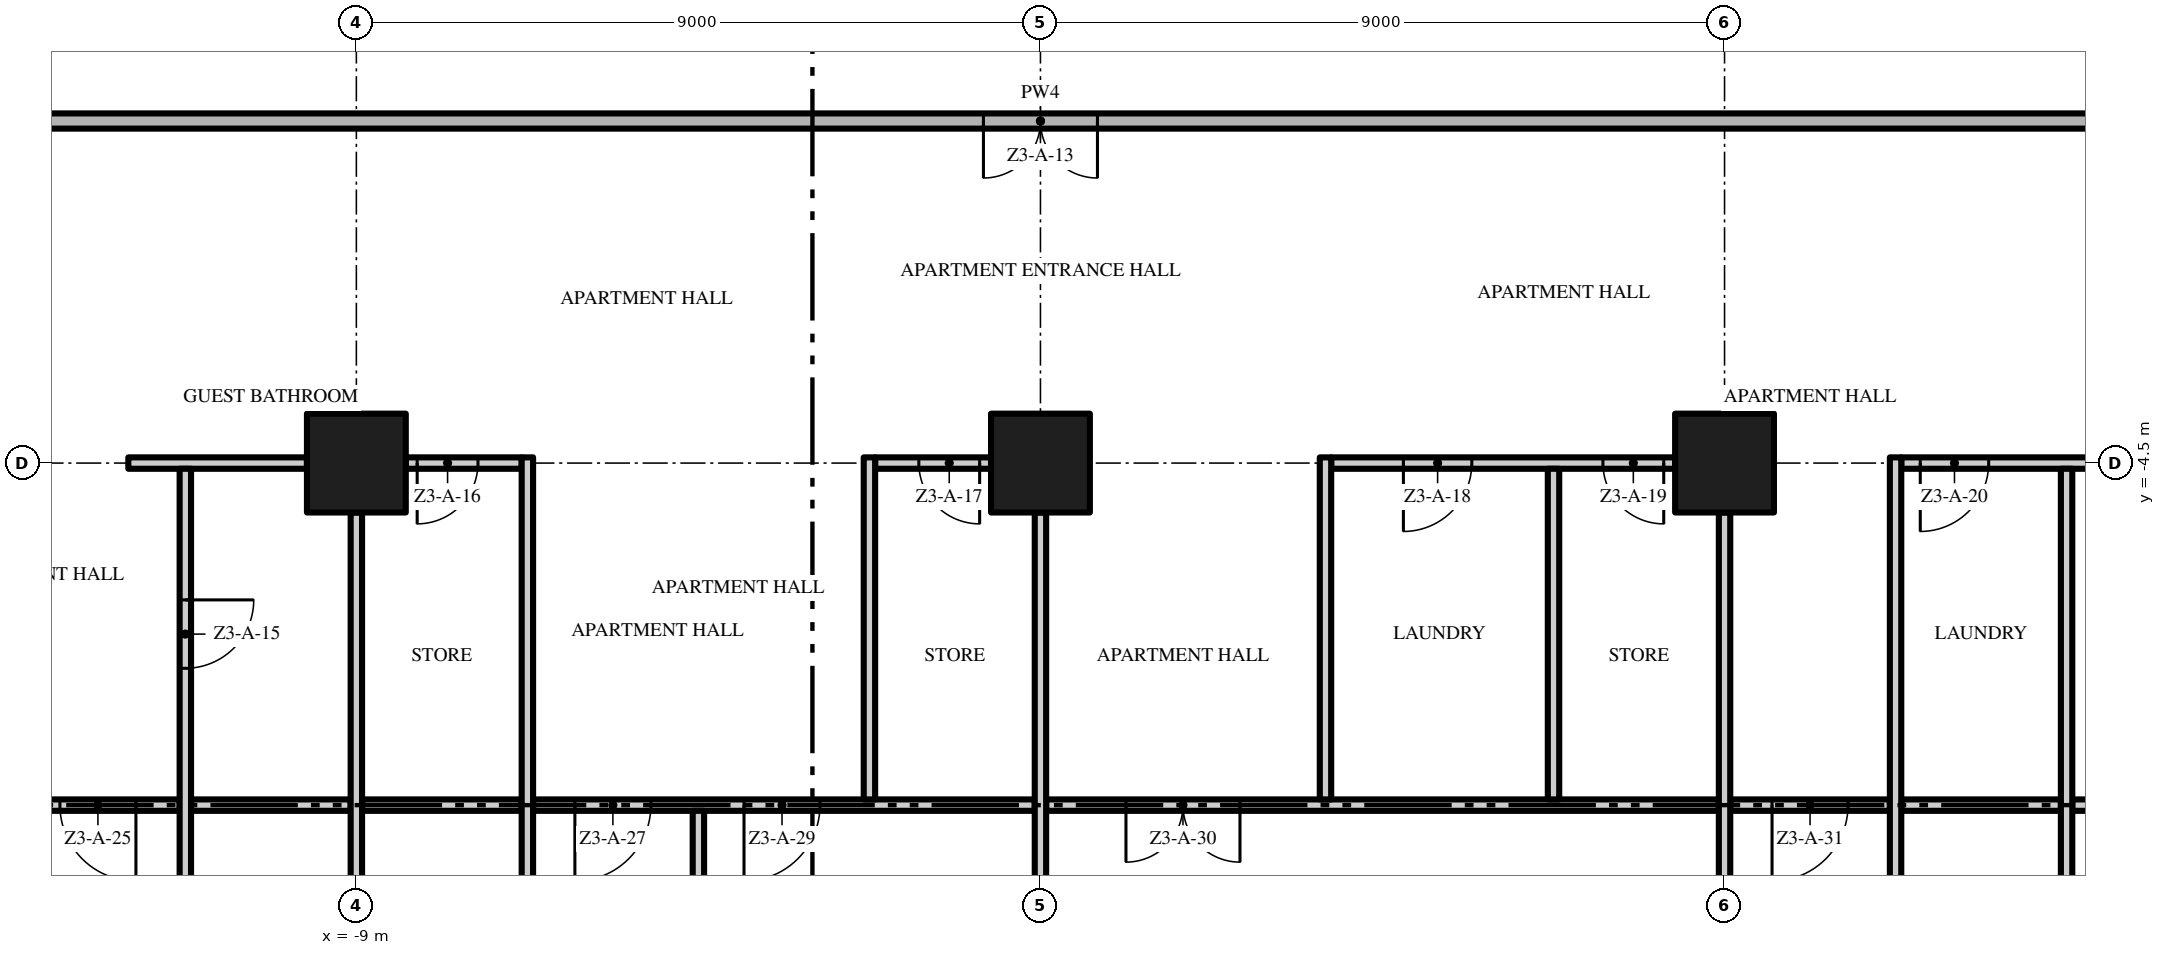
"""IFC4 building model, lengths in metres.
Left out: names, types, materials, properties, quantities, classifications, styles, units other than length and angle.
Written with IfcOpenShell. Run it as: python <this file> out.ifc"""

import sys

from ifc_helpers import new_model, si_unit, direction, frame, frame_2d, origin, origin_2d, place, context, subcontext, project, spatial, rectangle, extrude, element, fill, save


model = new_model("IFC4")
c1 = context("Model", 3, precision=1e-05, world=origin(), true_north=direction((0.0, 1.0)))
c2 = subcontext(c1, "Body", "Model", "MODEL_VIEW")
j1 = project(units=[si_unit("LENGTHUNIT", "METRE"), si_unit("PLANEANGLEUNIT", "RADIAN")], contexts=[c1])
p1 = place(None, origin())
s1 = spatial("IfcSite", under=j1, at=p1, CompositionType="ELEMENT")
p2 = place(p1, origin())
s2 = spatial("IfcBuilding", under=s1, at=p2, CompositionType="ELEMENT")
p3 = place(p2, frame((0.0, 0.0, 132.6)))
s3 = spatial("IfcBuildingStorey", under=s2, at=p3, CompositionType="ELEMENT", Elevation=132.6)
for number, where, z_axis, x_axis in (
    (1, (-9.0, -4.5, 0.0), (0.0, 0.0, 1.0), (1.0, 0.0, 0.0)),
    (2, (0.0, -4.5, 0.0), (0.0, 0.0, 1.0), (1.0, 0.0, 0.0)),
    (3, (9.0, -4.5, 0.0), (0.0, 0.0, 1.0), (1.0, 0.0, 0.0)),
):
    element("IfcColumn", number, at=place(p3, frame(where, z_axis=z_axis, x_axis=x_axis)), inside=s3, PredefinedType="COLUMN", context=c2, shape_type="SweptSolid", body=[
        extrude(rectangle(XDim=1.3, YDim=1.3, at=origin_2d()), origin(), (0.0, 0.0, 1.0), 3.5),
    ])
p4 = place(p3, frame((-11.325, -9.0, 0.0), z_axis=(0.0, 0.0, 1.0), x_axis=(-1.0, 0.0, 0.0)))
e4 = element("IfcWall", 4, at=p4, inside=s3, PredefinedType="PARTITIONING", context=c2, shape_type="SweptSolid", body=[
    extrude(rectangle(XDim=10.875, YDim=0.15, at=frame_2d((5.438, 0.0))), origin(), (0.0, 0.0, 1.0), 3.5),
])
p5 = place(p4, frame((3.175, 0.0, 0.0)))
e5 = element("IfcOpeningElement", 5, at=p5, cuts=e4, PredefinedType="OPENING", context=c2, shape_type="SweptSolid", body=[
    extrude(rectangle(XDim=1.8, YDim=2.4, at=frame_2d((0.9, 1.2))), frame((0.0, 0.085, 0.0), z_axis=(0.0, -1.0, 0.0), x_axis=(1.0, 0.0, 0.0)), (0.0, 0.0, 1.0), 0.17),
])
p6 = place(p4, frame((0.575, 0.0, 0.0)))
e6 = element("IfcOpeningElement", 6, at=p6, cuts=e4, PredefinedType="OPENING", context=c2, shape_type="SweptSolid", body=[
    extrude(rectangle(XDim=1.0, YDim=2.4, at=frame_2d((0.5, 1.2))), frame((0.0, 0.085, 0.0), z_axis=(0.0, -1.0, 0.0), x_axis=(1.0, 0.0, 0.0)), (0.0, 0.0, 1.0), 0.17),
])
for number, where, z_axis, x_axis in (
    (7, (-11.175, -9.0, 0.0), (0.0, 0.0, 1.0), (1.0, 0.0, 0.0)),
    (8, (-8.925, -9.0, 0.0), (0.0, 0.0, 1.0), (1.0, 0.0, 0.0)),
):
    element("IfcWall", number, at=place(p3, frame(where, z_axis=z_axis, x_axis=x_axis)), inside=s3, PredefinedType="PARTITIONING", context=c2, shape_type="SweptSolid", body=[
        extrude(rectangle(XDim=2.1, YDim=0.15, at=frame_2d((1.05, 0.0))), origin(), (0.0, 0.0, 1.0), 3.5),
    ])
p7 = place(p3, frame((-0.075, -9.0, 0.0), z_axis=(0.0, 0.0, 1.0), x_axis=(-1.0, 0.0, 0.0)))
e9 = element("IfcWall", 9, at=p7, inside=s3, PredefinedType="PARTITIONING", context=c2, shape_type="SweptSolid", body=[
    extrude(rectangle(XDim=6.6, YDim=0.15, at=frame_2d((3.3, 0.0))), origin(), (0.0, 0.0, 1.0), 3.5),
])
p8 = place(p7, frame((5.05, 0.0, 0.0)))
e10 = element("IfcOpeningElement", 10, at=p8, cuts=e9, PredefinedType="OPENING", context=c2, shape_type="SweptSolid", body=[
    extrude(rectangle(XDim=1.0, YDim=2.4, at=frame_2d((0.5, 1.2))), frame((0.0, 0.085, 0.0), z_axis=(0.0, -1.0, 0.0), x_axis=(1.0, 0.0, 0.0)), (0.0, 0.0, 1.0), 0.17),
])
p9 = place(p7, frame((2.825, 0.0, 0.0)))
e11 = element("IfcOpeningElement", 11, at=p9, cuts=e9, PredefinedType="OPENING", context=c2, shape_type="SweptSolid", body=[
    extrude(rectangle(XDim=1.0, YDim=2.4, at=frame_2d((0.5, 1.2))), frame((0.0, 0.085, 0.0), z_axis=(0.0, -1.0, 0.0), x_axis=(1.0, 0.0, 0.0)), (0.0, 0.0, 1.0), 0.17),
])
p10 = place(p3, frame((8.925, -9.0, 0.0), z_axis=(0.0, 0.0, 1.0), x_axis=(-1.0, 0.0, 0.0)))
e12 = element("IfcWall", 12, at=p10, inside=s3, PredefinedType="PARTITIONING", context=c2, shape_type="SweptSolid", body=[
    extrude(rectangle(XDim=8.85, YDim=0.15, at=frame_2d((4.425, 0.0))), origin(), (0.0, 0.0, 1.0), 3.5),
])
p11 = place(p10, frame((6.3, 0.0, 0.0)))
e13 = element("IfcOpeningElement", 13, at=p11, cuts=e12, PredefinedType="OPENING", context=c2, shape_type="SweptSolid", body=[
    extrude(rectangle(XDim=1.5, YDim=2.4, at=frame_2d((0.75, 1.2))), frame((0.0, 0.085, 0.0), z_axis=(0.0, -1.0, 0.0), x_axis=(1.0, 0.0, 0.0)), (0.0, 0.0, 1.0), 0.17),
])
p12 = place(p3, frame((11.175, -9.0, 0.0), z_axis=(0.0, 0.0, 1.0), x_axis=(-1.0, 0.0, 0.0)))
e14 = element("IfcWall", 14, at=p12, inside=s3, PredefinedType="PARTITIONING", context=c2, shape_type="SweptSolid", body=[
    extrude(rectangle(XDim=2.1, YDim=0.15, at=frame_2d((1.05, 0.0))), origin(), (0.0, 0.0, 1.0), 3.5),
])
p13 = place(p12, frame((0.55, 0.0, 0.0)))
e15 = element("IfcOpeningElement", 15, at=p13, cuts=e14, PredefinedType="OPENING", context=c2, shape_type="SweptSolid", body=[
    extrude(rectangle(XDim=1.0, YDim=2.4, at=frame_2d((0.5, 1.2))), frame((0.0, 0.085, 0.0), z_axis=(0.0, -1.0, 0.0), x_axis=(1.0, 0.0, 0.0)), (0.0, 0.0, 1.0), 0.17),
])
for number, where, z_axis, x_axis in (
    (16, (11.325, -9.0, 0.0), (0.0, 0.0, 1.0), (1.0, 0.0, 0.0)),
    (17, (13.575, -9.0, 0.0), (0.0, 0.0, 1.0), (1.0, 0.0, 0.0)),
):
    element("IfcWall", number, at=place(p3, frame(where, z_axis=z_axis, x_axis=x_axis)), inside=s3, PredefinedType="PARTITIONING", context=c2, shape_type="SweptSolid", body=[
        extrude(rectangle(XDim=2.1, YDim=0.15, at=frame_2d((1.05, 0.0))), origin(), (0.0, 0.0, 1.0), 3.5),
    ])
p14 = place(p3, frame((-12.0, -4.5, 0.0), z_axis=(0.0, 0.0, 1.0), x_axis=(1.0, 0.0, 0.0)))
e18 = element("IfcWall", 18, at=p14, inside=s3, PredefinedType="PARTITIONING", context=c2, shape_type="SweptSolid", body=[
    extrude(rectangle(XDim=2.35, YDim=0.15, at=frame_2d((1.175, 0.0))), origin(), (0.0, 0.0, 1.0), 3.5),
])
p15 = place(p3, frame((-6.825, -4.5, 0.0), z_axis=(0.0, 0.0, 1.0), x_axis=(-1.0, 0.0, 0.0)))
e19 = element("IfcWall", 19, at=p15, inside=s3, PredefinedType="PARTITIONING", context=c2, shape_type="SweptSolid", body=[
    extrude(rectangle(XDim=1.525, YDim=0.15, at=frame_2d((0.762, 0.0))), origin(), (0.0, 0.0, 1.0), 3.5),
])
p16 = place(p15, frame((0.575, 0.0, 0.0)))
e20 = element("IfcOpeningElement", 20, at=p16, cuts=e19, PredefinedType="OPENING", context=c2, shape_type="SweptSolid", body=[
    extrude(rectangle(XDim=0.8, YDim=2.0, at=frame_2d((0.4, 1.0))), frame((0.0, 0.085, 0.0), z_axis=(0.0, -1.0, 0.0), x_axis=(1.0, 0.0, 0.0)), (0.0, 0.0, 1.0), 0.17),
])
p17 = place(p3, frame((-0.65, -4.5, 0.0), z_axis=(0.0, 0.0, 1.0), x_axis=(-1.0, 0.0, 0.0)))
e21 = element("IfcWall", 21, at=p17, inside=s3, PredefinedType="PARTITIONING", context=c2, shape_type="SweptSolid", body=[
    extrude(rectangle(XDim=1.525, YDim=0.15, at=frame_2d((0.762, 0.0))), origin(), (0.0, 0.0, 1.0), 3.5),
])
p18 = place(p17, frame((0.15, 0.0, 0.0)))
e22 = element("IfcOpeningElement", 22, at=p18, cuts=e21, PredefinedType="OPENING", context=c2, shape_type="SweptSolid", body=[
    extrude(rectangle(XDim=0.8, YDim=2.0, at=frame_2d((0.4, 1.0))), frame((0.0, 0.085, 0.0), z_axis=(0.0, -1.0, 0.0), x_axis=(1.0, 0.0, 0.0)), (0.0, 0.0, 1.0), 0.17),
])
p19 = place(p3, frame((8.35, -4.5, 0.0), z_axis=(0.0, 0.0, 1.0), x_axis=(-1.0, 0.0, 0.0)))
e23 = element("IfcWall", 23, at=p19, inside=s3, PredefinedType="PARTITIONING", context=c2, shape_type="SweptSolid", body=[
    extrude(rectangle(XDim=4.525, YDim=0.15, at=frame_2d((2.263, 0.0))), origin(), (0.0, 0.0, 1.0), 3.5),
])
p20 = place(p19, frame((2.675, 0.0, 0.0)))
e24 = element("IfcOpeningElement", 24, at=p20, cuts=e23, PredefinedType="OPENING", context=c2, shape_type="SweptSolid", body=[
    extrude(rectangle(XDim=0.9, YDim=2.1, at=frame_2d((0.45, 1.05))), frame((0.0, 0.085, 0.0), z_axis=(0.0, -1.0, 0.0), x_axis=(1.0, 0.0, 0.0)), (0.0, 0.0, 1.0), 0.17),
])
p21 = place(p19, frame((0.15, 0.0, 0.0)))
e25 = element("IfcOpeningElement", 25, at=p21, cuts=e23, PredefinedType="OPENING", context=c2, shape_type="SweptSolid", body=[
    extrude(rectangle(XDim=0.8, YDim=2.0, at=frame_2d((0.4, 1.0))), frame((0.0, 0.085, 0.0), z_axis=(0.0, -1.0, 0.0), x_axis=(1.0, 0.0, 0.0)), (0.0, 0.0, 1.0), 0.17),
])
p22 = place(p3, frame((15.675, -4.5, 0.0), z_axis=(0.0, 0.0, 1.0), x_axis=(-1.0, 0.0, 0.0)))
e26 = element("IfcWall", 26, at=p22, inside=s3, PredefinedType="PARTITIONING", context=c2, shape_type="SweptSolid", body=[
    extrude(rectangle(XDim=4.35, YDim=0.15, at=frame_2d((2.175, 0.0))), origin(), (0.0, 0.0, 1.0), 3.5),
])
p23 = place(p22, frame((3.2, 0.0, 0.0)))
e27 = element("IfcOpeningElement", 27, at=p23, cuts=e26, PredefinedType="OPENING", context=c2, shape_type="SweptSolid", body=[
    extrude(rectangle(XDim=0.9, YDim=2.1, at=frame_2d((0.45, 1.05))), frame((0.0, 0.085, 0.0), z_axis=(0.0, -1.0, 0.0), x_axis=(1.0, 0.0, 0.0)), (0.0, 0.0, 1.0), 0.17),
])
p24 = place(p22, frame((0.675, 0.0, 0.0)))
e28 = element("IfcOpeningElement", 28, at=p24, cuts=e26, PredefinedType="OPENING", context=c2, shape_type="SweptSolid", body=[
    extrude(rectangle(XDim=0.8, YDim=2.0, at=frame_2d((0.4, 1.0))), frame((0.0, 0.085, 0.0), z_axis=(0.0, -1.0, 0.0), x_axis=(1.0, 0.0, 0.0)), (0.0, 0.0, 1.0), 0.17),
])
p25 = place(p3, frame((17.5, 0.0, 0.0), z_axis=(0.0, 0.0, 1.0), x_axis=(-1.0, 0.0, 0.0)))
e29 = element("IfcWall", 29, at=p25, inside=s3, PredefinedType="PARTITIONING", context=c2, shape_type="SweptSolid", body=[
    extrude(rectangle(XDim=35.0, YDim=0.2, at=frame_2d((17.5, 0.0))), origin(), (0.0, 0.0, 1.0), 3.5),
])
p26 = place(p25, frame((16.75, 0.0, 0.0)))
e30 = element("IfcOpeningElement", 30, at=p26, cuts=e29, PredefinedType="OPENING", context=c2, shape_type="SweptSolid", body=[
    extrude(rectangle(XDim=1.5, YDim=2.4, at=frame_2d((0.75, 1.2))), frame((0.0, 0.11, 0.0), z_axis=(0.0, -1.0, 0.0), x_axis=(1.0, 0.0, 0.0)), (0.0, 0.0, 1.0), 0.22),
])
p27 = place(p3, frame((-11.25, -4.575, 0.0), z_axis=(0.0, 0.0, 1.0), x_axis=(0.0, -1.0, 0.0)))
e31 = element("IfcWall", 31, at=p27, inside=s3, PredefinedType="PARTITIONING", context=c2, shape_type="SweptSolid", body=[
    extrude(rectangle(XDim=7.5, YDim=0.15, at=frame_2d((3.75, 0.0))), origin(), (0.0, 0.0, 1.0), 3.5),
])
p28 = place(p27, frame((1.725, 0.0, 0.0)))
e32 = element("IfcOpeningElement", 32, at=p28, cuts=e31, PredefinedType="OPENING", context=c2, shape_type="SweptSolid", body=[
    extrude(rectangle(XDim=0.9, YDim=2.1, at=frame_2d((0.45, 1.05))), frame((0.0, 0.085, 0.0), z_axis=(0.0, -1.0, 0.0), x_axis=(1.0, 0.0, 0.0)), (0.0, 0.0, 1.0), 0.17),
])
p29 = place(p3, frame((-9.0, -12.85, 0.0), z_axis=(0.0, 0.0, 1.0), x_axis=(0.0, 1.0, 0.0)))
e33 = element("IfcWall", 33, at=p29, inside=s3, PredefinedType="PARTITIONING", context=c2, shape_type="SweptSolid", body=[
    extrude(rectangle(XDim=7.7, YDim=0.15, at=frame_2d((3.85, 0.0))), origin(), (0.0, 0.0, 1.0), 3.5),
])
p30 = place(p3, frame((-6.75, -12.075, 0.0), z_axis=(0.0, 0.0, 1.0), x_axis=(0.0, 1.0, 0.0)))
e34 = element("IfcWall", 34, at=p30, inside=s3, PredefinedType="PARTITIONING", context=c2, shape_type="SweptSolid", body=[
    extrude(rectangle(XDim=7.65, YDim=0.15, at=frame_2d((3.825, 0.0))), origin(), (0.0, 0.0, 1.0), 3.5),
])
p31 = place(p3, frame((-4.5, -17.7, 0.0), z_axis=(0.0, 0.0, 1.0), x_axis=(0.0, 1.0, 0.0)))
e35 = element("IfcWall", 35, at=p31, inside=s3, PredefinedType="PARTITIONING", context=c2, shape_type="SweptSolid", body=[
    extrude(rectangle(XDim=8.625, YDim=0.15, at=frame_2d((4.312, 0.0))), origin(), (0.0, 0.0, 1.0), 3.5),
])
p32 = place(p3, frame((-2.25, -8.925, 0.0), z_axis=(0.0, 0.0, 1.0), x_axis=(0.0, 1.0, 0.0)))
e36 = element("IfcWall", 36, at=p32, inside=s3, PredefinedType="PARTITIONING", context=c2, shape_type="SweptSolid", body=[
    extrude(rectangle(XDim=4.5, YDim=0.15, at=frame_2d((2.25, 0.0))), origin(), (0.0, 0.0, 1.0), 3.5),
])
p33 = place(p3, frame((0.0, -12.85, 0.0), z_axis=(0.0, 0.0, 1.0), x_axis=(0.0, 1.0, 0.0)))
e37 = element("IfcWall", 37, at=p33, inside=s3, PredefinedType="PARTITIONING", context=c2, shape_type="SweptSolid", body=[
    extrude(rectangle(XDim=7.7, YDim=0.15, at=frame_2d((3.85, 0.0))), origin(), (0.0, 0.0, 1.0), 3.5),
])
p34 = place(p3, frame((3.75, -8.925, 0.0), z_axis=(0.0, 0.0, 1.0), x_axis=(0.0, 1.0, 0.0)))
e38 = element("IfcWall", 38, at=p34, inside=s3, PredefinedType="PARTITIONING", context=c2, shape_type="SweptSolid", body=[
    extrude(rectangle(XDim=4.5, YDim=0.15, at=frame_2d((2.25, 0.0))), origin(), (0.0, 0.0, 1.0), 3.5),
])
p35 = place(p3, frame((6.75, -8.925, 0.0), z_axis=(0.0, 0.0, 1.0), x_axis=(0.0, 1.0, 0.0)))
e39 = element("IfcWall", 39, at=p35, inside=s3, PredefinedType="PARTITIONING", context=c2, shape_type="SweptSolid", body=[
    extrude(rectangle(XDim=4.35, YDim=0.15, at=frame_2d((2.175, 0.0))), origin(), (0.0, 0.0, 1.0), 3.5),
])
p36 = place(p3, frame((9.0, -12.85, 0.0), z_axis=(0.0, 0.0, 1.0), x_axis=(0.0, 1.0, 0.0)))
e40 = element("IfcWall", 40, at=p36, inside=s3, PredefinedType="PARTITIONING", context=c2, shape_type="SweptSolid", body=[
    extrude(rectangle(XDim=7.7, YDim=0.15, at=frame_2d((3.85, 0.0))), origin(), (0.0, 0.0, 1.0), 3.5),
])
p37 = place(p3, frame((11.25, -12.075, 0.0), z_axis=(0.0, 0.0, 1.0), x_axis=(0.0, 1.0, 0.0)))
e41 = element("IfcWall", 41, at=p37, inside=s3, PredefinedType="PARTITIONING", context=c2, shape_type="SweptSolid", body=[
    extrude(rectangle(XDim=7.65, YDim=0.15, at=frame_2d((3.825, 0.0))), origin(), (0.0, 0.0, 1.0), 3.5),
])
p38 = place(p3, frame((13.5, -17.7, 0.0), z_axis=(0.0, 0.0, 1.0), x_axis=(0.0, 1.0, 0.0)))
e42 = element("IfcWall", 42, at=p38, inside=s3, PredefinedType="PARTITIONING", context=c2, shape_type="SweptSolid", body=[
    extrude(rectangle(XDim=13.125, YDim=0.15, at=frame_2d((6.562, 0.0))), origin(), (0.0, 0.0, 1.0), 3.5),
])
p39 = place(p26, origin())
e43 = element("IfcDoor", 43, at=p39, inside=s3, OperationType="DOUBLE_DOOR_SINGLE_SWING", PredefinedType="DOOR", context=c2, shape_type="SweptSolid", body=[
    extrude(rectangle(XDim=1.5, YDim=2.4, at=frame_2d((0.75, 1.2))), frame((0.0, 0.025, 0.0), z_axis=(0.0, -1.0, 0.0), x_axis=(1.0, 0.0, 0.0)), (0.0, 0.0, 1.0), 0.05),
])
fill(e30, e43)
p40 = place(p28, origin())
e44 = element("IfcDoor", 44, at=p40, inside=s3, OperationType="SINGLE_SWING_LEFT", PredefinedType="DOOR", context=c2, shape_type="SweptSolid", body=[
    extrude(rectangle(XDim=0.9, YDim=2.1, at=frame_2d((0.45, 1.05))), frame((0.0, 0.025, 0.0), z_axis=(0.0, -1.0, 0.0), x_axis=(1.0, 0.0, 0.0)), (0.0, 0.0, 1.0), 0.05),
])
fill(e32, e44)
p41 = place(p16, origin())
e45 = element("IfcDoor", 45, at=p41, inside=s3, OperationType="SINGLE_SWING_RIGHT", PredefinedType="DOOR", context=c2, shape_type="SweptSolid", body=[
    extrude(rectangle(XDim=0.8, YDim=2.0, at=frame_2d((0.4, 1.0))), frame((0.0, 0.025, 0.0), z_axis=(0.0, -1.0, 0.0), x_axis=(1.0, 0.0, 0.0)), (0.0, 0.0, 1.0), 0.05),
])
fill(e20, e45)
p42 = place(p18, origin())
e46 = element("IfcDoor", 46, at=p42, inside=s3, OperationType="SINGLE_SWING_LEFT", PredefinedType="DOOR", context=c2, shape_type="SweptSolid", body=[
    extrude(rectangle(XDim=0.8, YDim=2.0, at=frame_2d((0.4, 1.0))), frame((0.0, 0.025, 0.0), z_axis=(0.0, -1.0, 0.0), x_axis=(1.0, 0.0, 0.0)), (0.0, 0.0, 1.0), 0.05),
])
fill(e22, e46)
p43 = place(p20, origin())
e47 = element("IfcDoor", 47, at=p43, inside=s3, OperationType="SINGLE_SWING_RIGHT", PredefinedType="DOOR", context=c2, shape_type="SweptSolid", body=[
    extrude(rectangle(XDim=0.9, YDim=2.1, at=frame_2d((0.45, 1.05))), frame((0.0, 0.025, 0.0), z_axis=(0.0, -1.0, 0.0), x_axis=(1.0, 0.0, 0.0)), (0.0, 0.0, 1.0), 0.05),
])
fill(e24, e47)
p44 = place(p21, origin())
e48 = element("IfcDoor", 48, at=p44, inside=s3, OperationType="SINGLE_SWING_LEFT", PredefinedType="DOOR", context=c2, shape_type="SweptSolid", body=[
    extrude(rectangle(XDim=0.8, YDim=2.0, at=frame_2d((0.4, 1.0))), frame((0.0, 0.025, 0.0), z_axis=(0.0, -1.0, 0.0), x_axis=(1.0, 0.0, 0.0)), (0.0, 0.0, 1.0), 0.05),
])
fill(e25, e48)
p45 = place(p23, origin())
e49 = element("IfcDoor", 49, at=p45, inside=s3, OperationType="SINGLE_SWING_RIGHT", PredefinedType="DOOR", context=c2, shape_type="SweptSolid", body=[
    extrude(rectangle(XDim=0.9, YDim=2.1, at=frame_2d((0.45, 1.05))), frame((0.0, 0.025, 0.0), z_axis=(0.0, -1.0, 0.0), x_axis=(1.0, 0.0, 0.0)), (0.0, 0.0, 1.0), 0.05),
])
fill(e27, e49)
p46 = place(p6, origin())
e50 = element("IfcDoor", 50, at=p46, inside=s3, OperationType="SINGLE_SWING_LEFT", PredefinedType="DOOR", context=c2, shape_type="SweptSolid", body=[
    extrude(rectangle(XDim=1.0, YDim=2.4, at=frame_2d((0.5, 1.2))), frame((0.0, 0.025, 0.0), z_axis=(0.0, -1.0, 0.0), x_axis=(1.0, 0.0, 0.0)), (0.0, 0.0, 1.0), 0.05),
])
fill(e6, e50)
p47 = place(p8, origin())
e51 = element("IfcDoor", 51, at=p47, inside=s3, OperationType="SINGLE_SWING_RIGHT", PredefinedType="DOOR", context=c2, shape_type="SweptSolid", body=[
    extrude(rectangle(XDim=1.0, YDim=2.4, at=frame_2d((0.5, 1.2))), frame((0.0, 0.025, 0.0), z_axis=(0.0, -1.0, 0.0), x_axis=(1.0, 0.0, 0.0)), (0.0, 0.0, 1.0), 0.05),
])
fill(e10, e51)
p48 = place(p9, origin())
e52 = element("IfcDoor", 52, at=p48, inside=s3, OperationType="SINGLE_SWING_RIGHT", PredefinedType="DOOR", context=c2, shape_type="SweptSolid", body=[
    extrude(rectangle(XDim=1.0, YDim=2.4, at=frame_2d((0.5, 1.2))), frame((0.0, 0.025, 0.0), z_axis=(0.0, -1.0, 0.0), x_axis=(1.0, 0.0, 0.0)), (0.0, 0.0, 1.0), 0.05),
])
fill(e11, e52)
p49 = place(p11, origin())
e53 = element("IfcDoor", 53, at=p49, inside=s3, OperationType="DOUBLE_DOOR_SINGLE_SWING", PredefinedType="DOOR", context=c2, shape_type="SweptSolid", body=[
    extrude(rectangle(XDim=1.5, YDim=2.4, at=frame_2d((0.75, 1.2))), frame((0.0, 0.025, 0.0), z_axis=(0.0, -1.0, 0.0), x_axis=(1.0, 0.0, 0.0)), (0.0, 0.0, 1.0), 0.05),
])
fill(e13, e53)
p50 = place(p13, origin())
e54 = element("IfcDoor", 54, at=p50, inside=s3, OperationType="SINGLE_SWING_RIGHT", PredefinedType="DOOR", context=c2, shape_type="SweptSolid", body=[
    extrude(rectangle(XDim=1.0, YDim=2.4, at=frame_2d((0.5, 1.2))), frame((0.0, 0.025, 0.0), z_axis=(0.0, -1.0, 0.0), x_axis=(1.0, 0.0, 0.0)), (0.0, 0.0, 1.0), 0.05),
])
fill(e15, e54)
save(model, sys.argv[1])
